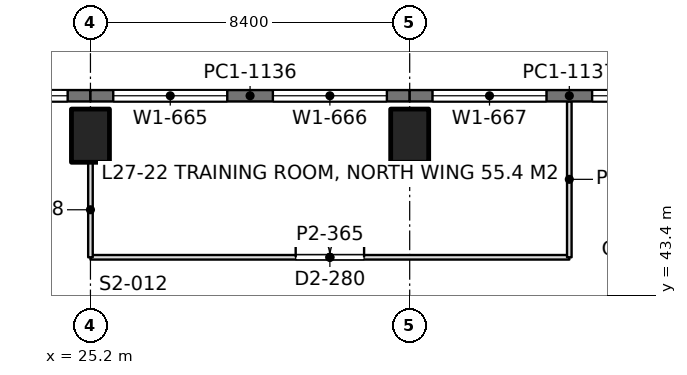
"""IFC4 building model, lengths in metres.
Left out: names, types, materials, properties, quantities, classifications, styles, units other than length and angle.
Written with IfcOpenShell. Run it as: python <this file> out.ifc"""

import sys

from ifc_helpers import new_model, si_unit, direction, frame, frame_2d, origin, origin_2d, place, context, subcontext, project, spatial, rectangle, extrude, element, fill, save


model = new_model("IFC4")
c1 = context("Model", 3, precision=1e-05, world=origin(), true_north=direction((0.0, 1.0)))
c2 = subcontext(c1, "Body", "Model", "MODEL_VIEW")
j1 = project(units=[si_unit("LENGTHUNIT", "METRE"), si_unit("PLANEANGLEUNIT", "RADIAN")], contexts=[c1])
p1 = place(None, origin())
s1 = spatial("IfcSite", under=j1, at=p1, CompositionType="ELEMENT")
p2 = place(p1, origin())
s2 = spatial("IfcBuilding", under=s1, at=p2, CompositionType="ELEMENT")
p3 = place(p2, frame((0.0, 0.0, 121.8)))
s3 = spatial("IfcBuildingStorey", under=s2, at=p3, CompositionType="ELEMENT", Elevation=121.8)
for number, where, z_axis, x_axis in (
    (1, (25.2, 47.6, 0.0), (0.0, 0.0, 1.0), (1.0, 0.0, 0.0)),
    (2, (33.6, 47.6, 0.0), (0.0, 0.0, 1.0), (1.0, 0.0, 0.0)),
):
    element("IfcColumn", number, at=place(p3, frame(where, z_axis=z_axis, x_axis=x_axis)), inside=s3, PredefinedType="COLUMN", context=c2, shape_type="SweptSolid", body=[
        extrude(rectangle(XDim=1.0, YDim=1.4, at=origin_2d()), origin(), (0.0, 0.0, 1.0), 4.2),
    ])
p4 = place(p3, frame((16.8, 48.65, 0.0), z_axis=(0.0, 0.0, 1.0), x_axis=(1.0, 0.0, 0.0)))
e3 = element("IfcWall", 3, at=p4, inside=s3, PredefinedType="SOLIDWALL", context=c2, shape_type="SweptSolid", body=[
    extrude(rectangle(XDim=8.4, YDim=0.3, at=frame_2d((4.2, 0.0))), origin(), (0.0, 0.0, 1.0), 4.05),
])
p5 = place(p4, frame((0.6, 0.0, 0.9)))
e4 = element("IfcOpeningElement", 4, at=p5, cuts=e3, PredefinedType="OPENING", context=c2, shape_type="SweptSolid", body=[
    extrude(rectangle(XDim=3.0, YDim=1.9, at=frame_2d((1.5, 0.95))), frame((0.0, 0.16, 0.0), z_axis=(0.0, -1.0, 0.0), x_axis=(1.0, 0.0, 0.0)), (0.0, 0.0, 1.0), 0.32),
])
p6 = place(p4, frame((4.8, 0.0, 0.9)))
e5 = element("IfcOpeningElement", 5, at=p6, cuts=e3, PredefinedType="OPENING", context=c2, shape_type="SweptSolid", body=[
    extrude(rectangle(XDim=3.0, YDim=1.9, at=frame_2d((1.5, 0.95))), frame((0.0, 0.16, 0.0), z_axis=(0.0, -1.0, 0.0), x_axis=(1.0, 0.0, 0.0)), (0.0, 0.0, 1.0), 0.32),
])
p7 = place(p3, frame((25.2, 48.65, 0.0), z_axis=(0.0, 0.0, 1.0), x_axis=(1.0, 0.0, 0.0)))
e6 = element("IfcWall", 6, at=p7, inside=s3, PredefinedType="SOLIDWALL", context=c2, shape_type="SweptSolid", body=[
    extrude(rectangle(XDim=8.4, YDim=0.3, at=frame_2d((4.2, 0.0))), origin(), (0.0, 0.0, 1.0), 4.05),
])
p8 = place(p7, frame((0.6, 0.0, 0.9)))
e7 = element("IfcOpeningElement", 7, at=p8, cuts=e6, PredefinedType="OPENING", context=c2, shape_type="SweptSolid", body=[
    extrude(rectangle(XDim=3.0, YDim=1.9, at=frame_2d((1.5, 0.95))), frame((0.0, 0.16, 0.0), z_axis=(0.0, -1.0, 0.0), x_axis=(1.0, 0.0, 0.0)), (0.0, 0.0, 1.0), 0.32),
])
p9 = place(p7, frame((4.8, 0.0, 0.9)))
e8 = element("IfcOpeningElement", 8, at=p9, cuts=e6, PredefinedType="OPENING", context=c2, shape_type="SweptSolid", body=[
    extrude(rectangle(XDim=3.0, YDim=1.9, at=frame_2d((1.5, 0.95))), frame((0.0, 0.16, 0.0), z_axis=(0.0, -1.0, 0.0), x_axis=(1.0, 0.0, 0.0)), (0.0, 0.0, 1.0), 0.32),
])
p10 = place(p3, frame((33.6, 48.65, 0.0), z_axis=(0.0, 0.0, 1.0), x_axis=(1.0, 0.0, 0.0)))
e9 = element("IfcWall", 9, at=p10, inside=s3, PredefinedType="SOLIDWALL", context=c2, shape_type="SweptSolid", body=[
    extrude(rectangle(XDim=8.4, YDim=0.3, at=frame_2d((4.2, 0.0))), origin(), (0.0, 0.0, 1.0), 4.05),
])
p11 = place(p10, frame((0.6, 0.0, 0.9)))
e10 = element("IfcOpeningElement", 10, at=p11, cuts=e9, PredefinedType="OPENING", context=c2, shape_type="SweptSolid", body=[
    extrude(rectangle(XDim=3.0, YDim=1.9, at=frame_2d((1.5, 0.95))), frame((0.0, 0.16, 0.0), z_axis=(0.0, -1.0, 0.0), x_axis=(1.0, 0.0, 0.0)), (0.0, 0.0, 1.0), 0.32),
])
p12 = place(p10, frame((4.8, 0.0, 0.9)))
e11 = element("IfcOpeningElement", 11, at=p12, cuts=e9, PredefinedType="OPENING", context=c2, shape_type="SweptSolid", body=[
    extrude(rectangle(XDim=3.0, YDim=1.9, at=frame_2d((1.5, 0.95))), frame((0.0, 0.16, 0.0), z_axis=(0.0, -1.0, 0.0), x_axis=(1.0, 0.0, 0.0)), (0.0, 0.0, 1.0), 0.32),
])
p13 = place(p3, frame((25.2, 44.4, 0.0), z_axis=(0.0, 0.0, 1.0), x_axis=(1.0, 0.0, 0.0)))
e12 = element("IfcWall", 12, at=p13, inside=s3, PredefinedType="PARTITIONING", context=c2, shape_type="SweptSolid", body=[
    extrude(rectangle(XDim=12.6, YDim=0.12, at=frame_2d((6.3, 0.0))), origin(), (0.0, 0.0, 1.0), 3.55),
])
p14 = place(p13, frame((5.4, 0.0, 0.0)))
e13 = element("IfcOpeningElement", 13, at=p14, cuts=e12, PredefinedType="OPENING", context=c2, shape_type="SweptSolid", body=[
    extrude(rectangle(XDim=1.8, YDim=2.2, at=frame_2d((0.9, 1.1))), frame((0.0, 0.07, 0.0), z_axis=(0.0, -1.0, 0.0), x_axis=(1.0, 0.0, 0.0)), (0.0, 0.0, 1.0), 0.14),
])
p15 = place(p3, frame((25.2, 44.4, 0.0), z_axis=(0.0, 0.0, 1.0), x_axis=(0.0, 1.0, 0.0)))
e14 = element("IfcWall", 14, at=p15, inside=s3, PredefinedType="PARTITIONING", context=c2, shape_type="SweptSolid", body=[
    extrude(rectangle(XDim=2.501, YDim=0.12, at=frame_2d((1.25, 0.0))), origin(), (0.0, 0.0, 1.0), 3.55),
])
p16 = place(p3, frame((37.8, 44.4, 0.0), z_axis=(0.0, 0.0, 1.0), x_axis=(0.0, 1.0, 0.0)))
e15 = element("IfcWall", 15, at=p16, inside=s3, PredefinedType="PARTITIONING", context=c2, shape_type="SweptSolid", body=[
    extrude(rectangle(XDim=4.102, YDim=0.12, at=frame_2d((2.051, 0.0))), origin(), (0.0, 0.0, 1.0), 3.56),
])
p17 = place(p6, origin())
e16 = element("IfcWindow", 16, at=p17, inside=s3, PartitioningType="SINGLE_PANEL", PredefinedType="WINDOW", context=c2, shape_type="SweptSolid", body=[
    extrude(rectangle(XDim=3.0, YDim=1.9, at=frame_2d((1.5, 0.95))), frame((0.0, 0.03, 0.0), z_axis=(0.0, -1.0, 0.0), x_axis=(1.0, 0.0, 0.0)), (0.0, 0.0, 1.0), 0.06),
])
fill(e5, e16)
p18 = place(p8, origin())
e17 = element("IfcWindow", 17, at=p18, inside=s3, PartitioningType="SINGLE_PANEL", PredefinedType="WINDOW", context=c2, shape_type="SweptSolid", body=[
    extrude(rectangle(XDim=3.0, YDim=1.9, at=frame_2d((1.5, 0.95))), frame((0.0, 0.03, 0.0), z_axis=(0.0, -1.0, 0.0), x_axis=(1.0, 0.0, 0.0)), (0.0, 0.0, 1.0), 0.06),
])
fill(e7, e17)
p19 = place(p9, origin())
e18 = element("IfcWindow", 18, at=p19, inside=s3, PartitioningType="SINGLE_PANEL", PredefinedType="WINDOW", context=c2, shape_type="SweptSolid", body=[
    extrude(rectangle(XDim=3.0, YDim=1.9, at=frame_2d((1.5, 0.95))), frame((0.0, 0.03, 0.0), z_axis=(0.0, -1.0, 0.0), x_axis=(1.0, 0.0, 0.0)), (0.0, 0.0, 1.0), 0.06),
])
fill(e8, e18)
p20 = place(p11, origin())
e19 = element("IfcWindow", 19, at=p20, inside=s3, PartitioningType="SINGLE_PANEL", PredefinedType="WINDOW", context=c2, shape_type="SweptSolid", body=[
    extrude(rectangle(XDim=3.0, YDim=1.9, at=frame_2d((1.5, 0.95))), frame((0.0, 0.03, 0.0), z_axis=(0.0, -1.0, 0.0), x_axis=(1.0, 0.0, 0.0)), (0.0, 0.0, 1.0), 0.06),
])
fill(e10, e19)
p21 = place(p12, origin())
e20 = element("IfcWindow", 20, at=p21, inside=s3, PartitioningType="SINGLE_PANEL", PredefinedType="WINDOW", context=c2, shape_type="SweptSolid", body=[
    extrude(rectangle(XDim=3.0, YDim=1.9, at=frame_2d((1.5, 0.95))), frame((0.0, 0.03, 0.0), z_axis=(0.0, -1.0, 0.0), x_axis=(1.0, 0.0, 0.0)), (0.0, 0.0, 1.0), 0.06),
])
fill(e11, e20)
p22 = place(p14, origin())
e21 = element("IfcDoor", 21, at=p22, inside=s3, OperationType="DOUBLE_DOOR_SINGLE_SWING", PredefinedType="DOOR", context=c2, shape_type="SweptSolid", body=[
    extrude(rectangle(XDim=1.8, YDim=2.2, at=frame_2d((0.9, 1.1))), frame((0.0, 0.025, 0.0), z_axis=(0.0, -1.0, 0.0), x_axis=(1.0, 0.0, 0.0)), (0.0, 0.0, 1.0), 0.05),
])
fill(e13, e21)
save(model, sys.argv[1])
